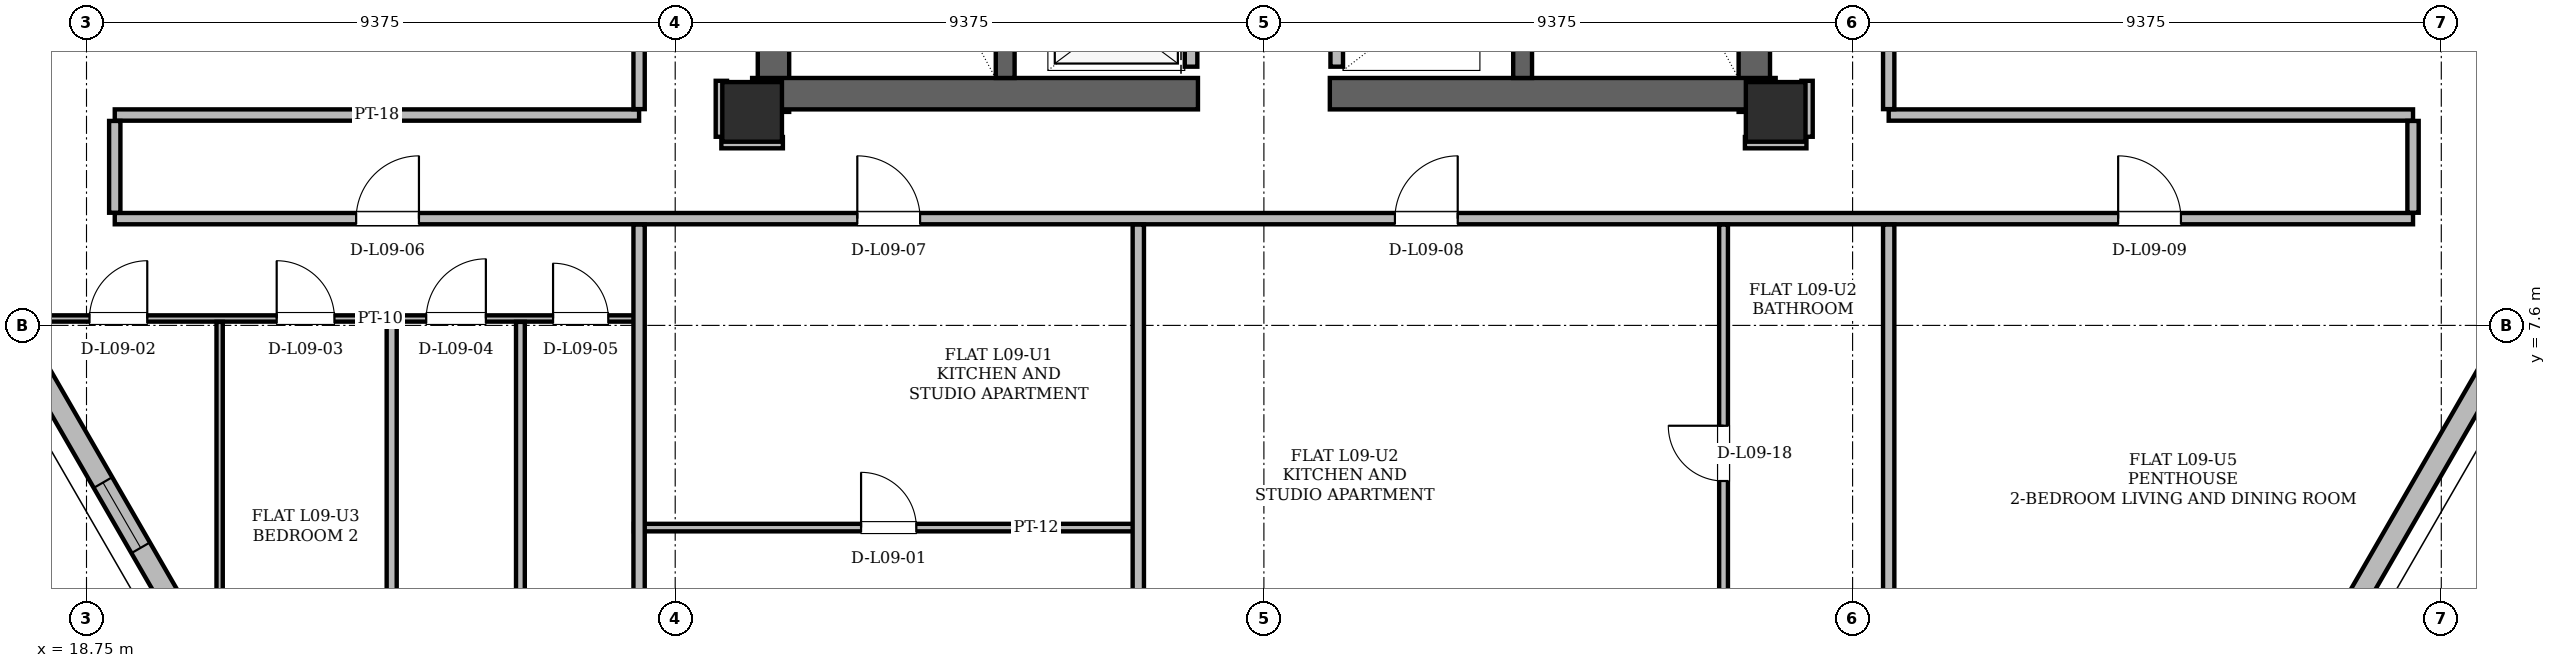
"""IFC4 building model, lengths in metres.
Left out: names, types, materials, properties, quantities, classifications, styles, units other than length and angle.
Written with IfcOpenShell. Run it as: python <this file> out.ifc"""

import sys

from ifc_helpers import new_model, si_unit, direction, frame, frame_2d, origin, origin_2d, place, context, subcontext, project, spatial, rectangle, hollow_rectangle, extrude, element, fill, save


model = new_model("IFC4")
c1 = context("Model", 3, precision=1e-05, world=origin(), true_north=direction((0.0, 1.0)))
c2 = subcontext(c1, "Body", "Model", "MODEL_VIEW")
j1 = project(units=[si_unit("LENGTHUNIT", "METRE"), si_unit("PLANEANGLEUNIT", "RADIAN")], contexts=[c1])
p1 = place(None, origin())
s1 = spatial("IfcSite", under=j1, at=p1, CompositionType="ELEMENT")
p2 = place(p1, origin())
s2 = spatial("IfcBuilding", under=s1, at=p2, CompositionType="ELEMENT")
p3 = place(p2, frame((0.0, 0.0, 38.1)))
s3 = spatial("IfcBuildingStorey", under=s2, at=p3, CompositionType="ELEMENT", Elevation=38.1)
for number, where, z_axis, x_axis in (
    (1, (29.35, 11.0, 0.0), (0.0, 0.0, 1.0), (1.0, 0.0, 0.0)),
    (2, (45.65, 11.0, 0.0), (0.0, 0.0, 1.0), (1.0, 0.0, 0.0)),
):
    element("IfcColumn", number, at=place(p3, frame(where, z_axis=z_axis, x_axis=x_axis)), inside=s3, PredefinedType="COLUMN", context=c2, shape_type="SweptSolid", body=[
        extrude(hollow_rectangle(XDim=0.95, YDim=0.95, WallThickness=0.08, at=origin_2d()), origin(), (0.0, 0.0, 1.0), 3.6),
    ])
for number, where, z_axis, x_axis in (
    (3, (29.69, 11.0, 0.0), (0.0, 0.0, 1.0), (0.0, 1.0, 0.0)),
    (4, (45.31, 11.0, 0.0), (0.0, 0.0, 1.0), (0.0, 1.0, 0.0)),
):
    element("IfcWall", number, at=place(p3, frame(where, z_axis=z_axis, x_axis=x_axis)), inside=s3, PredefinedType="SHEAR", context=c2, shape_type="SweptSolid", body=[
        extrude(rectangle(XDim=13.3, YDim=0.5, at=frame_2d((6.65, 0.0))), origin(), (0.0, 0.0, 1.0), 3.36),
    ])
for number, where, z_axis, x_axis in (
    (5, (29.35, 11.29, 0.0), (0.0, 0.0, 1.0), (1.0, 0.0, 0.0)),
    (6, (38.55, 11.29, 0.0), (0.0, 0.0, 1.0), (1.0, 0.0, 0.0)),
):
    element("IfcWall", number, at=place(p3, frame(where, z_axis=z_axis, x_axis=x_axis)), inside=s3, PredefinedType="SHEAR", context=c2, shape_type="SweptSolid", body=[
        extrude(rectangle(XDim=7.1, YDim=0.5, at=frame_2d((3.55, 0.0))), origin(), (0.0, 0.0, 1.0), 3.36),
    ])
for number, where, z_axis, x_axis in (
    (7, (33.38, 11.54, 0.0), (0.0, 0.0, 1.0), (0.0, 1.0, 0.0)),
    (8, (41.62, 11.54, 0.0), (0.0, 0.0, 1.0), (0.0, 1.0, 0.0)),
):
    element("IfcWall", number, at=place(p3, frame(where, z_axis=z_axis, x_axis=x_axis)), inside=s3, PredefinedType="SHEAR", context=c2, shape_type="SweptSolid", body=[
        extrude(rectangle(XDim=7.62, YDim=0.3, at=frame_2d((3.81, 0.0))), origin(), (0.0, 0.0, 1.0), 3.36),
    ])
p4 = place(p3, frame((13.287, 15.014, 0.0), z_axis=(0.0, 0.0, 1.0), x_axis=(0.499993183949, -0.866029338997, 0.0)))
e9 = element("IfcWall", 9, at=p4, inside=s3, PredefinedType="SOLIDWALL", context=c2, shape_type="SweptSolid", body=[
    extrude(rectangle(XDim=15.404, YDim=0.34, at=frame_2d((7.702, 0.0))), origin(), (0.0, 0.0, 1.0), 2.494),
])
p5 = place(p4, frame((5.067, 0.0, 0.85)))
e10 = element("IfcOpeningElement", 10, at=p5, cuts=e9, PredefinedType="OPENING", context=c2, shape_type="SweptSolid", body=[
    extrude(rectangle(XDim=1.2, YDim=1.48, at=frame_2d((0.6, 0.74))), frame((0.0, 0.17, 0.0), z_axis=(0.0, -1.0, 0.0), x_axis=(1.0, 0.0, 0.0)), (0.0, 0.0, 1.0), 0.34),
])
p6 = place(p4, frame((11.451, 0.0, 0.85)))
e11 = element("IfcOpeningElement", 11, at=p6, cuts=e9, PredefinedType="OPENING", context=c2, shape_type="SweptSolid", body=[
    extrude(rectangle(XDim=1.2, YDim=1.48, at=frame_2d((0.6, 0.74))), frame((0.0, 0.17, 0.0), z_axis=(0.0, -1.0, 0.0), x_axis=(1.0, 0.0, 0.0)), (0.0, 0.0, 1.0), 0.34),
])
p7 = place(p3, frame((54.011, 1.674, 0.0), z_axis=(0.0, 0.0, 1.0), x_axis=(0.499993183949, 0.866029338997, 0.0)))
e12 = element("IfcWall", 12, at=p7, inside=s3, PredefinedType="SOLIDWALL", context=c2, shape_type="SweptSolid", body=[
    extrude(rectangle(XDim=15.404, YDim=0.34, at=frame_2d((7.702, 0.0))), origin(), (0.0, 0.0, 1.0), 2.494),
])
p8 = place(p3, frame((36.34, 11.72, 0.0), z_axis=(0.0, 0.0, 1.0), x_axis=(0.0, 1.0, 0.0)))
e13 = element("IfcWall", 13, at=p8, inside=s3, PredefinedType="PARTITIONING", context=c2, shape_type="SweptSolid", body=[
    extrude(rectangle(XDim=7.6, YDim=0.2, at=frame_2d((3.8, 0.0))), origin(), (0.0, 0.0, 1.0), 3.36),
])
p9 = place(p8, frame((0.255, 0.0, 0.0)))
e14 = element("IfcOpeningElement", 14, at=p9, cuts=e13, PredefinedType="OPENING", context=c2, shape_type="SweptSolid", body=[
    extrude(rectangle(XDim=1.05, YDim=2.15, at=frame_2d((0.525, 1.075))), frame((0.0, 0.1, 0.0), z_axis=(0.0, -1.0, 0.0), x_axis=(1.0, 0.0, 0.0)), (0.0, 0.0, 1.0), 0.2),
])
p10 = place(p8, frame((2.105, 0.0, 0.0)))
e15 = element("IfcOpeningElement", 15, at=p10, cuts=e13, PredefinedType="OPENING", context=c2, shape_type="SweptSolid", body=[
    extrude(rectangle(XDim=1.05, YDim=2.15, at=frame_2d((0.525, 1.075))), frame((0.0, 0.1, 0.0), z_axis=(0.0, -1.0, 0.0), x_axis=(1.0, 0.0, 0.0)), (0.0, 0.0, 1.0), 0.2),
])
p11 = place(p8, frame((3.955, 0.0, 0.0)))
e16 = element("IfcOpeningElement", 16, at=p11, cuts=e13, PredefinedType="OPENING", context=c2, shape_type="SweptSolid", body=[
    extrude(rectangle(XDim=1.05, YDim=2.15, at=frame_2d((0.525, 1.075))), frame((0.0, 0.1, 0.0), z_axis=(0.0, -1.0, 0.0), x_axis=(1.0, 0.0, 0.0)), (0.0, 0.0, 1.0), 0.2),
])
p12 = place(p3, frame((38.66, 11.72, 0.0), z_axis=(0.0, 0.0, 1.0), x_axis=(0.0, 1.0, 0.0)))
e17 = element("IfcWall", 17, at=p12, inside=s3, PredefinedType="PARTITIONING", context=c2, shape_type="SweptSolid", body=[
    extrude(rectangle(XDim=9.1, YDim=0.2, at=frame_2d((4.55, 0.0))), origin(), (0.0, 0.0, 1.0), 3.36),
])
p13 = place(p3, frame((27.468, 4.38, 0.0), z_axis=(0.0, 0.0, 1.0), x_axis=(1.0, 0.0, 0.0)))
e18 = element("IfcWall", 18, at=p13, inside=s3, PredefinedType="PARTITIONING", context=c2, shape_type="SweptSolid", body=[
    extrude(rectangle(XDim=8.114, YDim=0.12, at=frame_2d((4.057, 0.0))), origin(), (0.0, 0.0, 1.0), 2.946),
])
p14 = place(p13, frame((3.617, 0.0, 0.0)))
e19 = element("IfcOpeningElement", 19, at=p14, cuts=e18, PredefinedType="OPENING", context=c2, shape_type="SweptSolid", body=[
    extrude(rectangle(XDim=0.88, YDim=2.08, at=frame_2d((0.44, 1.04))), frame((0.0, 0.06, 0.0), z_axis=(0.0, -1.0, 0.0), x_axis=(1.0, 0.0, 0.0)), (0.0, 0.0, 1.0), 0.12),
])
p15 = place(p3, frame((17.705, 7.71, 0.0), z_axis=(0.0, 0.0, 1.0), x_axis=(1.0, 0.0, 0.0)))
e20 = element("IfcWall", 20, at=p15, inside=s3, PredefinedType="PARTITIONING", context=c2, shape_type="SweptSolid", body=[
    extrude(rectangle(XDim=9.895, YDim=0.1, at=frame_2d((4.948, 0.0))), origin(), (0.0, 0.0, 1.0), 2.738),
])
p16 = place(p15, frame((1.093, 0.0, 0.0)))
e21 = element("IfcOpeningElement", 21, at=p16, cuts=e20, PredefinedType="OPENING", context=c2, shape_type="SweptSolid", body=[
    extrude(rectangle(XDim=0.92, YDim=2.12, at=frame_2d((0.46, 1.06))), frame((0.0, 0.05, 0.0), z_axis=(0.0, -1.0, 0.0), x_axis=(1.0, 0.0, 0.0)), (0.0, 0.0, 1.0), 0.1),
])
p17 = place(p15, frame((4.073, 0.0, 0.0)))
e22 = element("IfcOpeningElement", 22, at=p17, cuts=e20, PredefinedType="OPENING", context=c2, shape_type="SweptSolid", body=[
    extrude(rectangle(XDim=0.92, YDim=2.12, at=frame_2d((0.46, 1.06))), frame((0.0, 0.05, 0.0), z_axis=(0.0, -1.0, 0.0), x_axis=(1.0, 0.0, 0.0)), (0.0, 0.0, 1.0), 0.1),
])
p18 = place(p15, frame((6.455, 0.0, 0.0)))
e23 = element("IfcOpeningElement", 23, at=p18, cuts=e20, PredefinedType="OPENING", context=c2, shape_type="SweptSolid", body=[
    extrude(rectangle(XDim=0.95, YDim=2.1, at=frame_2d((0.475, 1.05))), frame((0.0, 0.05, 0.0), z_axis=(0.0, -1.0, 0.0), x_axis=(1.0, 0.0, 0.0)), (0.0, 0.0, 1.0), 0.1),
])
p19 = place(p15, frame((8.475, 0.0, 0.0)))
e24 = element("IfcOpeningElement", 24, at=p19, cuts=e20, PredefinedType="OPENING", context=c2, shape_type="SweptSolid", body=[
    extrude(rectangle(XDim=0.88, YDim=2.08, at=frame_2d((0.44, 1.04))), frame((0.0, 0.05, 0.0), z_axis=(0.0, -1.0, 0.0), x_axis=(1.0, 0.0, 0.0)), (0.0, 0.0, 1.0), 0.1),
])
p20 = place(p3, frame((19.2, 9.3, 0.0), z_axis=(0.0, 0.0, 1.0), x_axis=(1.0, 0.0, 0.0)))
e25 = element("IfcWall", 25, at=p20, inside=s3, PredefinedType="PARTITIONING", context=c2, shape_type="SweptSolid", body=[
    extrude(rectangle(XDim=36.6, YDim=0.18, at=frame_2d((18.3, 0.0))), origin(), (0.0, 0.0, 1.0), 2.738),
])
p21 = place(p20, frame((3.844, 0.0, 0.0)))
e26 = element("IfcOpeningElement", 26, at=p21, cuts=e25, PredefinedType="OPENING", context=c2, shape_type="SweptSolid", body=[
    extrude(rectangle(XDim=1.0, YDim=2.18, at=frame_2d((0.5, 1.09))), frame((0.0, 0.09, 0.0), z_axis=(0.0, -1.0, 0.0), x_axis=(1.0, 0.0, 0.0)), (0.0, 0.0, 1.0), 0.18),
])
p22 = place(p20, frame((11.825, 0.0, 0.0)))
e27 = element("IfcOpeningElement", 27, at=p22, cuts=e25, PredefinedType="OPENING", context=c2, shape_type="SweptSolid", body=[
    extrude(rectangle(XDim=1.0, YDim=2.18, at=frame_2d((0.5, 1.09))), frame((0.0, 0.09, 0.0), z_axis=(0.0, -1.0, 0.0), x_axis=(1.0, 0.0, 0.0)), (0.0, 0.0, 1.0), 0.18),
])
p23 = place(p20, frame((20.387, 0.0, 0.0)))
e28 = element("IfcOpeningElement", 28, at=p23, cuts=e25, PredefinedType="OPENING", context=c2, shape_type="SweptSolid", body=[
    extrude(rectangle(XDim=1.0, YDim=2.18, at=frame_2d((0.5, 1.09))), frame((0.0, 0.09, 0.0), z_axis=(0.0, -1.0, 0.0), x_axis=(1.0, 0.0, 0.0)), (0.0, 0.0, 1.0), 0.18),
])
p24 = place(p20, frame((31.904, 0.0, 0.0)))
e29 = element("IfcOpeningElement", 29, at=p24, cuts=e25, PredefinedType="OPENING", context=c2, shape_type="SweptSolid", body=[
    extrude(rectangle(XDim=1.0, YDim=2.18, at=frame_2d((0.5, 1.09))), frame((0.0, 0.09, 0.0), z_axis=(0.0, -1.0, 0.0), x_axis=(1.0, 0.0, 0.0)), (0.0, 0.0, 1.0), 0.18),
])
for number, where, z_axis, x_axis in (
    (30, (28.86, 10.51, 0.0), (0.0, 0.0, 1.0), (1.0, 0.0, 0.0)),
    (31, (45.16, 10.51, 0.0), (0.0, 0.0, 1.0), (1.0, 0.0, 0.0)),
):
    element("IfcWall", number, at=place(p3, frame(where, z_axis=z_axis, x_axis=x_axis)), inside=s3, PredefinedType="PARTITIONING", context=c2, shape_type="SweptSolid", body=[
        extrude(rectangle(XDim=0.98, YDim=0.18, at=frame_2d((0.49, 0.0))), origin(), (0.0, 0.0, 1.0), 2.738),
    ])
for number, where, z_axis, x_axis in (
    (32, (19.2, 10.95, 0.0), (0.0, 0.0, 1.0), (1.0, 0.0, 0.0)),
    (33, (47.45, 10.95, 0.0), (0.0, 0.0, 1.0), (1.0, 0.0, 0.0)),
):
    element("IfcWall", number, at=place(p3, frame(where, z_axis=z_axis, x_axis=x_axis)), inside=s3, PredefinedType="PARTITIONING", context=c2, shape_type="SweptSolid", body=[
        extrude(rectangle(XDim=8.35, YDim=0.18, at=frame_2d((4.175, 0.0))), origin(), (0.0, 0.0, 1.0), 3.36),
    ])
p25 = place(p3, frame((19.2, 9.394, 0.0), z_axis=(0.0, 0.0, 1.0), x_axis=(0.0, 1.0, 0.0)))
e34 = element("IfcWall", 34, at=p25, inside=s3, PredefinedType="PARTITIONING", context=c2, shape_type="SweptSolid", body=[
    extrude(rectangle(XDim=1.462, YDim=0.18, at=frame_2d((0.731, 0.0))), origin(), (0.0, 0.0, 1.0), 3.36),
])
p26 = place(p3, frame((20.87, 2.228, 0.0), z_axis=(0.0, 0.0, 1.0), x_axis=(0.0, 1.0, 0.0)))
e35 = element("IfcWall", 35, at=p26, inside=s3, PredefinedType="PARTITIONING", context=c2, shape_type="SweptSolid", body=[
    extrude(rectangle(XDim=5.428, YDim=0.1, at=frame_2d((2.714, 0.0))), origin(), (0.0, 0.0, 1.0), 3.36),
])
p27 = place(p3, frame((23.61, 1.848, 0.0), z_axis=(0.0, 0.0, 1.0), x_axis=(0.0, 1.0, 0.0)))
e36 = element("IfcWall", 36, at=p27, inside=s3, PredefinedType="PARTITIONING", context=c2, shape_type="SweptSolid", body=[
    extrude(rectangle(XDim=5.808, YDim=0.16, at=frame_2d((2.904, 0.0))), origin(), (0.0, 0.0, 1.0), 2.738),
])
p28 = place(p3, frame((25.66, 1.848, 0.0), z_axis=(0.0, 0.0, 1.0), x_axis=(0.0, 1.0, 0.0)))
e37 = element("IfcWall", 37, at=p28, inside=s3, PredefinedType="PARTITIONING", context=c2, shape_type="SweptSolid", body=[
    extrude(rectangle(XDim=5.808, YDim=0.14, at=frame_2d((2.904, 0.0))), origin(), (0.0, 0.0, 1.0), 2.738),
])
p29 = place(p3, frame((27.55, 1.848, 0.0), z_axis=(0.0, 0.0, 1.0), x_axis=(0.0, 1.0, 0.0)))
e38 = element("IfcWall", 38, at=p29, inside=s3, PredefinedType="PARTITIONING", context=c2, shape_type="SweptSolid", body=[
    extrude(rectangle(XDim=7.358, YDim=0.18, at=frame_2d((3.679, 0.0))), origin(), (0.0, 0.0, 1.0), 2.738),
])
p30 = place(p3, frame((27.55, 11.044, 0.0), z_axis=(0.0, 0.0, 1.0), x_axis=(0.0, 1.0, 0.0)))
e39 = element("IfcWall", 39, at=p30, inside=s3, PredefinedType="PARTITIONING", context=c2, shape_type="SweptSolid", body=[
    extrude(rectangle(XDim=28.326, YDim=0.18, at=frame_2d((14.163, 0.0))), origin(), (0.0, 0.0, 1.0), 2.494),
])
p31 = place(p30, frame((8.121, 0.0, 0.0)))
e40 = element("IfcOpeningElement", 40, at=p31, cuts=e39, PredefinedType="OPENING", context=c2, shape_type="SweptSolid", body=[
    extrude(rectangle(XDim=1.0, YDim=2.18, at=frame_2d((0.5, 1.09))), frame((0.0, 0.09, 0.0), z_axis=(0.0, -1.0, 0.0), x_axis=(1.0, 0.0, 0.0)), (0.0, 0.0, 1.0), 0.18),
])
p32 = place(p3, frame((28.86, 10.604, 0.0), z_axis=(0.0, 0.0, 1.0), x_axis=(0.0, 1.0, 0.0)))
e41 = element("IfcWall", 41, at=p32, inside=s3, PredefinedType="PARTITIONING", context=c2, shape_type="SweptSolid", body=[
    extrude(rectangle(XDim=0.891, YDim=0.18, at=frame_2d((0.446, 0.0))), origin(), (0.0, 0.0, 1.0), 2.738),
])
p33 = place(p3, frame((35.5, 1.848, 0.0), z_axis=(0.0, 0.0, 1.0), x_axis=(0.0, 1.0, 0.0)))
e42 = element("IfcWall", 42, at=p33, inside=s3, PredefinedType="PARTITIONING", context=c2, shape_type="SweptSolid", body=[
    extrude(rectangle(XDim=7.358, YDim=0.18, at=frame_2d((3.679, 0.0))), origin(), (0.0, 0.0, 1.0), 3.36),
])
p34 = place(p3, frame((44.82, 1.848, 0.0), z_axis=(0.0, 0.0, 1.0), x_axis=(0.0, 1.0, 0.0)))
e43 = element("IfcWall", 43, at=p34, inside=s3, PredefinedType="PARTITIONING", context=c2, shape_type="SweptSolid", body=[
    extrude(rectangle(XDim=7.358, YDim=0.14, at=frame_2d((3.679, 0.0))), origin(), (0.0, 0.0, 1.0), 2.946),
])
p35 = place(p34, frame((3.274, 0.0, 0.0)))
e44 = element("IfcOpeningElement", 44, at=p35, cuts=e43, PredefinedType="OPENING", context=c2, shape_type="SweptSolid", body=[
    extrude(rectangle(XDim=0.88, YDim=2.08, at=frame_2d((0.44, 1.04))), frame((0.0, 0.07, 0.0), z_axis=(0.0, -1.0, 0.0), x_axis=(1.0, 0.0, 0.0)), (0.0, 0.0, 1.0), 0.14),
])
p36 = place(p3, frame((46.15, 10.604, 0.0), z_axis=(0.0, 0.0, 1.0), x_axis=(0.0, 1.0, 0.0)))
e45 = element("IfcWall", 45, at=p36, inside=s3, PredefinedType="PARTITIONING", context=c2, shape_type="SweptSolid", body=[
    extrude(rectangle(XDim=0.891, YDim=0.18, at=frame_2d((0.446, 0.0))), origin(), (0.0, 0.0, 1.0), 2.738),
])
p37 = place(p3, frame((47.45, 1.848, 0.0), z_axis=(0.0, 0.0, 1.0), x_axis=(0.0, 1.0, 0.0)))
e46 = element("IfcWall", 46, at=p37, inside=s3, PredefinedType="PARTITIONING", context=c2, shape_type="SweptSolid", body=[
    extrude(rectangle(XDim=7.358, YDim=0.18, at=frame_2d((3.679, 0.0))), origin(), (0.0, 0.0, 1.0), 2.738),
])
p38 = place(p3, frame((47.45, 11.044, 0.0), z_axis=(0.0, 0.0, 1.0), x_axis=(0.0, 1.0, 0.0)))
e47 = element("IfcWall", 47, at=p38, inside=s3, PredefinedType="PARTITIONING", context=c2, shape_type="SweptSolid", body=[
    extrude(rectangle(XDim=28.326, YDim=0.18, at=frame_2d((14.163, 0.0))), origin(), (0.0, 0.0, 1.0), 2.494),
])
p39 = place(p38, frame((10.822, 0.0, 0.0)))
e48 = element("IfcOpeningElement", 48, at=p39, cuts=e47, PredefinedType="OPENING", context=c2, shape_type="SweptSolid", body=[
    extrude(rectangle(XDim=1.0, YDim=2.18, at=frame_2d((0.5, 1.09))), frame((0.0, 0.09, 0.0), z_axis=(0.0, -1.0, 0.0), x_axis=(1.0, 0.0, 0.0)), (0.0, 0.0, 1.0), 0.18),
])
p40 = place(p3, frame((55.8, 9.394, 0.0), z_axis=(0.0, 0.0, 1.0), x_axis=(0.0, 1.0, 0.0)))
e49 = element("IfcWall", 49, at=p40, inside=s3, PredefinedType="PARTITIONING", context=c2, shape_type="SweptSolid", body=[
    extrude(rectangle(XDim=1.462, YDim=0.18, at=frame_2d((0.731, 0.0))), origin(), (0.0, 0.0, 1.0), 3.36),
])
p41 = place(p6, origin())
e50 = element("IfcWindow", 50, at=p41, inside=s3, PartitioningType="SINGLE_PANEL", PredefinedType="WINDOW", context=c2, shape_type="SweptSolid", body=[
    extrude(rectangle(XDim=1.2, YDim=1.48, at=frame_2d((0.6, 0.74))), frame((0.0, 0.03, 0.0), z_axis=(0.0, -1.0, 0.0), x_axis=(1.0, 0.0, 0.0)), (0.0, 0.0, 1.0), 0.06),
])
fill(e11, e50)
p42 = place(p14, origin())
e51 = element("IfcDoor", 51, at=p42, inside=s3, OperationType="SINGLE_SWING_LEFT", PredefinedType="DOOR", context=c2, shape_type="SweptSolid", body=[
    extrude(rectangle(XDim=0.88, YDim=2.08, at=frame_2d((0.44, 1.04))), frame((0.0, 0.025, 0.0), z_axis=(0.0, -1.0, 0.0), x_axis=(1.0, 0.0, 0.0)), (0.0, 0.0, 1.0), 0.05),
])
fill(e19, e51)
p43 = place(p16, origin())
e52 = element("IfcDoor", 52, at=p43, inside=s3, OperationType="SINGLE_SWING_RIGHT", PredefinedType="DOOR", context=c2, shape_type="SweptSolid", body=[
    extrude(rectangle(XDim=0.92, YDim=2.12, at=frame_2d((0.46, 1.06))), frame((0.0, 0.025, 0.0), z_axis=(0.0, -1.0, 0.0), x_axis=(1.0, 0.0, 0.0)), (0.0, 0.0, 1.0), 0.05),
])
fill(e21, e52)
p44 = place(p17, origin())
e53 = element("IfcDoor", 53, at=p44, inside=s3, OperationType="SINGLE_SWING_LEFT", PredefinedType="DOOR", context=c2, shape_type="SweptSolid", body=[
    extrude(rectangle(XDim=0.92, YDim=2.12, at=frame_2d((0.46, 1.06))), frame((0.0, 0.025, 0.0), z_axis=(0.0, -1.0, 0.0), x_axis=(1.0, 0.0, 0.0)), (0.0, 0.0, 1.0), 0.05),
])
fill(e22, e53)
p45 = place(p18, origin())
e54 = element("IfcDoor", 54, at=p45, inside=s3, OperationType="SINGLE_SWING_RIGHT", PredefinedType="DOOR", context=c2, shape_type="SweptSolid", body=[
    extrude(rectangle(XDim=0.95, YDim=2.1, at=frame_2d((0.475, 1.05))), frame((0.0, 0.025, 0.0), z_axis=(0.0, -1.0, 0.0), x_axis=(1.0, 0.0, 0.0)), (0.0, 0.0, 1.0), 0.05),
])
fill(e23, e54)
p46 = place(p19, origin())
e55 = element("IfcDoor", 55, at=p46, inside=s3, OperationType="SINGLE_SWING_LEFT", PredefinedType="DOOR", context=c2, shape_type="SweptSolid", body=[
    extrude(rectangle(XDim=0.88, YDim=2.08, at=frame_2d((0.44, 1.04))), frame((0.0, 0.025, 0.0), z_axis=(0.0, -1.0, 0.0), x_axis=(1.0, 0.0, 0.0)), (0.0, 0.0, 1.0), 0.05),
])
fill(e24, e55)
p47 = place(p21, origin())
e56 = element("IfcDoor", 56, at=p47, inside=s3, OperationType="SINGLE_SWING_RIGHT", PredefinedType="DOOR", context=c2, shape_type="SweptSolid", body=[
    extrude(rectangle(XDim=1.0, YDim=2.18, at=frame_2d((0.5, 1.09))), frame((0.0, 0.025, 0.0), z_axis=(0.0, -1.0, 0.0), x_axis=(1.0, 0.0, 0.0)), (0.0, 0.0, 1.0), 0.05),
])
fill(e26, e56)
p48 = place(p22, origin())
e57 = element("IfcDoor", 57, at=p48, inside=s3, OperationType="SINGLE_SWING_LEFT", PredefinedType="DOOR", context=c2, shape_type="SweptSolid", body=[
    extrude(rectangle(XDim=1.0, YDim=2.18, at=frame_2d((0.5, 1.09))), frame((0.0, 0.025, 0.0), z_axis=(0.0, -1.0, 0.0), x_axis=(1.0, 0.0, 0.0)), (0.0, 0.0, 1.0), 0.05),
])
fill(e27, e57)
p49 = place(p23, origin())
e58 = element("IfcDoor", 58, at=p49, inside=s3, OperationType="SINGLE_SWING_RIGHT", PredefinedType="DOOR", context=c2, shape_type="SweptSolid", body=[
    extrude(rectangle(XDim=1.0, YDim=2.18, at=frame_2d((0.5, 1.09))), frame((0.0, 0.025, 0.0), z_axis=(0.0, -1.0, 0.0), x_axis=(1.0, 0.0, 0.0)), (0.0, 0.0, 1.0), 0.05),
])
fill(e28, e58)
p50 = place(p24, origin())
e59 = element("IfcDoor", 59, at=p50, inside=s3, OperationType="SINGLE_SWING_LEFT", PredefinedType="DOOR", context=c2, shape_type="SweptSolid", body=[
    extrude(rectangle(XDim=1.0, YDim=2.18, at=frame_2d((0.5, 1.09))), frame((0.0, 0.025, 0.0), z_axis=(0.0, -1.0, 0.0), x_axis=(1.0, 0.0, 0.0)), (0.0, 0.0, 1.0), 0.05),
])
fill(e29, e59)
p51 = place(p35, origin())
e60 = element("IfcDoor", 60, at=p51, inside=s3, OperationType="SINGLE_SWING_RIGHT", PredefinedType="DOOR", context=c2, shape_type="SweptSolid", body=[
    extrude(rectangle(XDim=0.88, YDim=2.08, at=frame_2d((0.44, 1.04))), frame((0.0, 0.025, 0.0), z_axis=(0.0, -1.0, 0.0), x_axis=(1.0, 0.0, 0.0)), (0.0, 0.0, 1.0), 0.05),
])
fill(e44, e60)
save(model, sys.argv[1])
